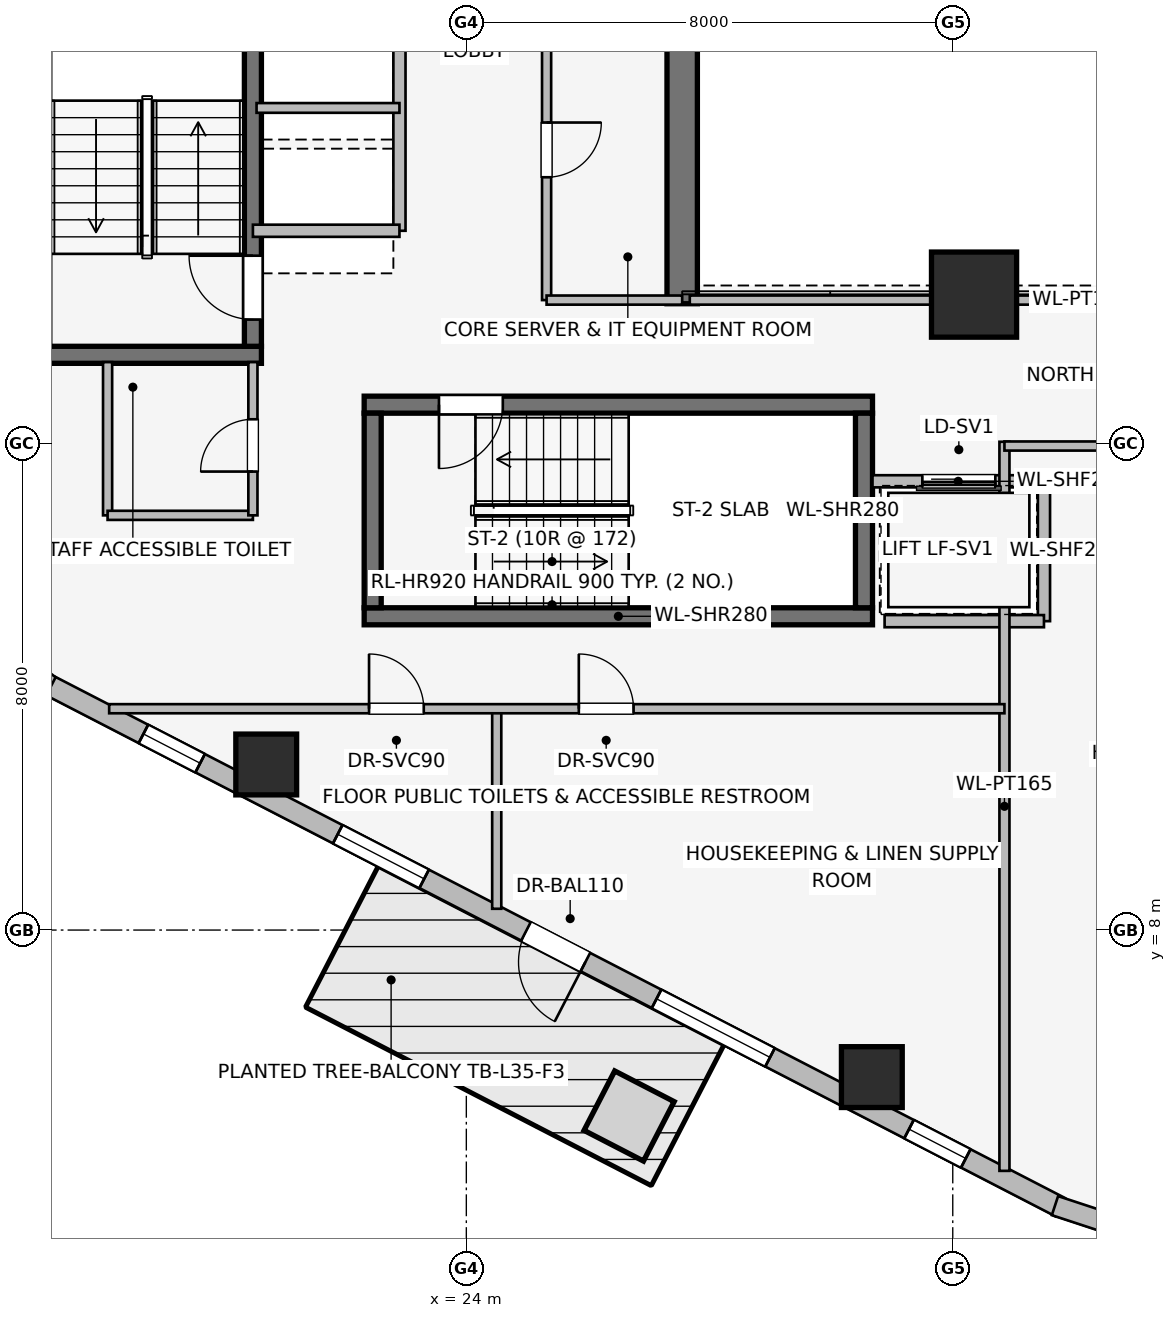
"""IFC4 building model, lengths in metres.
Left out: names, types, materials, properties, quantities, classifications, styles, units other than length and angle.
Written with IfcOpenShell. Run it as: python <this file> out.ifc"""

import sys

from ifc_helpers import new_model, si_unit, direction, frame, frame_2d, origin, origin_2d, place, context, subcontext, project, spatial, rectangle, extrude, element, fill, save


model = new_model("IFC4")
c1 = context("Model", 3, precision=1e-05, world=origin(), true_north=direction((0.0, 1.0)))
c2 = subcontext(c1, "Body", "Model", "MODEL_VIEW")
j1 = project(units=[si_unit("LENGTHUNIT", "METRE"), si_unit("PLANEANGLEUNIT", "RADIAN")], contexts=[c1])
p1 = place(None, origin())
s1 = spatial("IfcSite", under=j1, at=p1, CompositionType="ELEMENT")
p2 = place(p1, origin())
s2 = spatial("IfcBuilding", under=s1, at=p2, CompositionType="ELEMENT")
p3 = place(p2, frame((0.0, 0.0, 132.6)))
s3 = spatial("IfcBuildingStorey", under=s2, at=p3, CompositionType="ELEMENT", Elevation=132.6)
p4 = place(p3, frame((27.55, 29.55, 0.0), z_axis=(0.0, 0.0, 1.0), x_axis=(0.0, -1.0, 0.0)))
e1 = element("IfcWall", 1, at=p4, inside=s3, PredefinedType="SHEAR", context=c2, shape_type="SweptSolid", body=[
    extrude(rectangle(XDim=11.25, YDim=0.5, at=frame_2d((5.625, 0.0))), origin(), (0.0, 0.0, 1.0), 3.45),
])
p5 = place(p3, frame((16.87, 17.46, 0.0), z_axis=(0.0, 0.0, 1.0), x_axis=(1.0, 0.0, 0.0)))
e2 = element("IfcWall", 2, at=p5, inside=s3, PredefinedType="SHEAR", context=c2, shape_type="SweptSolid", body=[
    extrude(rectangle(XDim=3.76, YDim=0.28, at=frame_2d((1.88, 0.0))), origin(), (0.0, 0.0, 1.0), 3.45),
])
p6 = place(p3, frame((20.49, 17.6, 0.0), z_axis=(0.0, 0.0, 1.0), x_axis=(0.0, 1.0, 0.0)))
e3 = element("IfcWall", 3, at=p6, inside=s3, PredefinedType="SHEAR", context=c2, shape_type="SweptSolid", body=[
    extrude(rectangle(XDim=7.8, YDim=0.28, at=frame_2d((3.9, 0.0))), origin(), (0.0, 0.0, 1.0), 3.45),
])
p7 = place(p6, frame((0.44, 0.0, 0.0)))
e4 = element("IfcOpeningElement", 4, at=p7, cuts=e3, PredefinedType="OPENING", context=c2, shape_type="SweptSolid", body=[
    extrude(rectangle(XDim=1.05, YDim=2.0, at=frame_2d((0.525, 1.0))), frame((0.0, 0.15, 0.0), z_axis=(0.0, -1.0, 0.0), x_axis=(1.0, 0.0, 0.0)), (0.0, 0.0, 1.0), 0.3),
])
p8 = place(p3, frame((22.32, 13.16, 0.0), z_axis=(0.0, 0.0, 1.0), x_axis=(1.0, 0.0, 0.0)))
e5 = element("IfcWall", 5, at=p8, inside=s3, PredefinedType="SHEAR", context=c2, shape_type="SweptSolid", body=[
    extrude(rectangle(XDim=8.36, YDim=0.28, at=frame_2d((4.18, 0.0))), origin(), (0.0, 0.0, 1.0), 3.45),
])
p9 = place(p3, frame((30.68, 16.64, 0.0), z_axis=(0.0, 0.0, 1.0), x_axis=(-1.0, 0.0, 0.0)))
e6 = element("IfcWall", 6, at=p9, inside=s3, PredefinedType="SHEAR", context=c2, shape_type="SweptSolid", body=[
    extrude(rectangle(XDim=8.36, YDim=0.28, at=frame_2d((4.18, 0.0))), origin(), (0.0, 0.0, 1.0), 3.45),
])
p10 = place(p9, frame((6.08, 0.0, 0.0)))
e7 = element("IfcOpeningElement", 7, at=p10, cuts=e6, PredefinedType="OPENING", context=c2, shape_type="SweptSolid", body=[
    extrude(rectangle(XDim=1.05, YDim=2.0, at=frame_2d((0.525, 1.0))), frame((0.0, 0.15, 0.0), z_axis=(0.0, -1.0, 0.0), x_axis=(1.0, 0.0, 0.0)), (0.0, 0.0, 1.0), 0.3),
])
for number, where, z_axis, x_axis in (
    (8, (22.46, 16.5, 0.0), (0.0, 0.0, 1.0), (0.0, -1.0, 0.0)),
    (9, (30.54, 13.3, 0.0), (0.0, 0.0, 1.0), (0.0, 1.0, 0.0)),
):
    element("IfcWall", number, at=place(p3, frame(where, z_axis=z_axis, x_axis=x_axis)), inside=s3, PredefinedType="SHEAR", context=c2, shape_type="SweptSolid", body=[
        extrude(rectangle(XDim=3.2, YDim=0.28, at=frame_2d((1.6, 0.0))), origin(), (0.0, 0.0, 1.0), 3.45),
    ])
p11 = place(p3, frame((32.35, 18.45, 0.0), z_axis=(0.0, 0.0, 1.0), x_axis=(1.0, 0.0, 0.0)))
e10 = element("IfcColumn", 10, at=p11, inside=s3, PredefinedType="COLUMN", context=c2, shape_type="SweptSolid", body=[
    extrude(rectangle(XDim=1.4, YDim=1.4, at=origin_2d()), origin(), (0.0, 0.0, 1.0), 3.45),
])
for number, where, z_axis, x_axis in (
    (11, (20.709, 10.723, 0.0), (0.0, 0.0, 1.0), (1.0, 0.0, 0.0)),
    (12, (30.669, 5.582, 0.0), (0.0, 0.0, 1.0), (1.0, 0.0, 0.0)),
):
    element("IfcColumn", number, at=place(p3, frame(where, z_axis=z_axis, x_axis=x_axis)), inside=s3, PredefinedType="COLUMN", context=c2, shape_type="SweptSolid", body=[
        extrude(rectangle(XDim=1.0, YDim=1.0, at=origin_2d()), origin(), (0.0, 0.0, 1.0), 3.45),
    ])
p12 = place(p3, frame((17.243, 11.95, 0.0), z_axis=(0.0, 0.0, 1.0), x_axis=(-0.790621329885, 0.612305408053, 0.0)))
e13 = element("IfcWall", 13, at=p12, inside=s3, PredefinedType="STANDARD", context=c2, shape_type="SweptSolid", body=[
    extrude(rectangle(XDim=1.676, YDim=0.33, at=frame_2d((0.838, 0.0))), origin(), (0.0, 0.0, 1.0), 3.19),
])
p13 = place(p3, frame((33.769, 3.442, 0.0), z_axis=(0.0, 0.0, 1.0), x_axis=(-0.888613612362, 0.458656568606, 0.0)))
e14 = element("IfcWall", 14, at=p13, inside=s3, PredefinedType="STANDARD", context=c2, shape_type="SweptSolid", body=[
    extrude(rectangle(XDim=18.681, YDim=0.34, at=frame_2d((9.34, 0.0))), origin(), (0.0, 0.0, 1.0), 3.19),
])
p14 = place(p13, frame((8.79, 0.0, 0.0)))
e15 = element("IfcOpeningElement", 15, at=p14, cuts=e14, PredefinedType="OPENING", context=c2, shape_type="SweptSolid", body=[
    extrude(rectangle(XDim=1.1, YDim=2.04, at=frame_2d((0.55, 1.02))), frame((0.0, 0.18, 0.0), z_axis=(0.0, -1.0, 0.0), x_axis=(1.0, 0.0, 0.0)), (0.0, 0.0, 1.0), 0.36),
])
p15 = place(p13, frame((1.75, 0.0, 0.75)))
e16 = element("IfcOpeningElement", 16, at=p15, cuts=e14, PredefinedType="OPENING", context=c2, shape_type="SweptSolid", body=[
    extrude(rectangle(XDim=1.05, YDim=1.4, at=frame_2d((0.525, 0.7))), frame((0.0, 0.18, 0.0), z_axis=(0.0, -1.0, 0.0), x_axis=(1.0, 0.0, 0.0)), (0.0, 0.0, 1.0), 0.36),
])
p16 = place(p13, frame((5.373, 0.0, 0.75)))
e17 = element("IfcOpeningElement", 17, at=p16, cuts=e14, PredefinedType="OPENING", context=c2, shape_type="SweptSolid", body=[
    extrude(rectangle(XDim=2.1, YDim=1.5, at=frame_2d((1.05, 0.75))), frame((0.0, 0.18, 0.0), z_axis=(0.0, -1.0, 0.0), x_axis=(1.0, 0.0, 0.0)), (0.0, 0.0, 1.0), 0.36),
])
p17 = place(p13, frame((11.774, 0.0, 0.75)))
e18 = element("IfcOpeningElement", 18, at=p17, cuts=e14, PredefinedType="OPENING", context=c2, shape_type="SweptSolid", body=[
    extrude(rectangle(XDim=1.6, YDim=1.55, at=frame_2d((0.8, 0.775))), frame((0.0, 0.18, 0.0), z_axis=(0.0, -1.0, 0.0), x_axis=(1.0, 0.0, 0.0)), (0.0, 0.0, 1.0), 0.36),
])
p18 = place(p13, frame((15.92, 0.0, 0.75)))
e19 = element("IfcOpeningElement", 19, at=p18, cuts=e14, PredefinedType="OPENING", context=c2, shape_type="SweptSolid", body=[
    extrude(rectangle(XDim=1.05, YDim=1.4, at=frame_2d((0.525, 0.7))), frame((0.0, 0.18, 0.0), z_axis=(0.0, -1.0, 0.0), x_axis=(1.0, 0.0, 0.0)), (0.0, 0.0, 1.0), 0.36),
])
p19 = place(p3, frame((35.317, 2.93, 0.0), z_axis=(0.0, 0.0, 1.0), x_axis=(-0.949937416267, 0.312440242569, 0.0)))
e20 = element("IfcWall", 20, at=p19, inside=s3, PredefinedType="STANDARD", context=c2, shape_type="SweptSolid", body=[
    extrude(rectangle(XDim=1.722, YDim=0.33, at=frame_2d((0.861, 0.0))), origin(), (0.0, 0.0, 1.0), 3.19),
])
p20 = place(p3, frame((33.5, 15.38, 0.0), z_axis=(0.0, 0.0, 1.0), x_axis=(-1.0, 0.0, 0.0)))
e21 = element("IfcWall", 21, at=p20, inside=s3, PredefinedType="PARTITIONING", context=c2, shape_type="SweptSolid", body=[
    extrude(rectangle(XDim=2.82, YDim=0.2, at=frame_2d((1.41, 0.0))), origin(), (0.0, 0.0, 1.0), 3.19),
])
p21 = place(p20, frame((0.8, 0.0, 0.0)))
e22 = element("IfcOpeningElement", 22, at=p21, cuts=e21, PredefinedType="OPENING", context=c2, shape_type="SweptSolid", body=[
    extrude(rectangle(XDim=1.2, YDim=2.2, at=frame_2d((0.6, 1.1))), frame((0.0, 0.11, 0.0), z_axis=(0.0, -1.0, 0.0), x_axis=(1.0, 0.0, 0.0)), (0.0, 0.0, 1.0), 0.22),
])
p22 = place(p3, frame((33.5, 13.08, 0.0), z_axis=(0.0, 0.0, 1.0), x_axis=(0.0, 1.0, 0.0)))
e23 = element("IfcWall", 23, at=p22, inside=s3, PredefinedType="PARTITIONING", context=c2, shape_type="SweptSolid", body=[
    extrude(rectangle(XDim=2.3, YDim=0.2, at=frame_2d((1.15, 0.0))), origin(), (0.0, 0.0, 1.0), 3.19),
])
p23 = place(p3, frame((30.879, 13.08, 0.0), z_axis=(0.0, 0.0, 1.0), x_axis=(1.0, 0.0, 0.0)))
e24 = element("IfcWall", 24, at=p23, inside=s3, PredefinedType="PARTITIONING", context=c2, shape_type="SweptSolid", body=[
    extrude(rectangle(XDim=2.621, YDim=0.2, at=frame_2d((1.311, 0.0))), origin(), (0.0, 0.0, 1.0), 3.19),
])
p24 = place(p3, frame((22.9, 19.5, 0.0), z_axis=(0.0, 0.0, 1.0), x_axis=(0.0, 1.0, 0.0)))
e25 = element("IfcWall", 25, at=p24, inside=s3, PredefinedType="PARTITIONING", context=c2, shape_type="SweptSolid", body=[
    extrude(rectangle(XDim=6.085, YDim=0.2, at=frame_2d((3.042, 0.0))), origin(), (0.0, 0.0, 1.0), 3.19),
])
p25 = place(p3, frame((20.49, 19.5, 0.0), z_axis=(0.0, 0.0, 1.0), x_axis=(1.0, 0.0, 0.0)))
e26 = element("IfcWall", 26, at=p25, inside=s3, PredefinedType="PARTITIONING", context=c2, shape_type="SweptSolid", body=[
    extrude(rectangle(XDim=2.41, YDim=0.2, at=frame_2d((1.205, 0.0))), origin(), (0.0, 0.0, 1.0), 2.09),
])
p26 = place(p3, frame((20.55, 21.52, 0.0), z_axis=(0.0, 0.0, 1.0), x_axis=(1.0, 0.0, 0.0)))
e27 = element("IfcWall", 27, at=p26, inside=s3, PredefinedType="PARTITIONING", context=c2, shape_type="SweptSolid", body=[
    extrude(rectangle(XDim=2.35, YDim=0.16, at=frame_2d((1.175, 0.0))), origin(), (0.0, 0.0, 1.0), 3.19),
])
p27 = place(p3, frame((25.32, 23.13, 0.0), z_axis=(0.0, 0.0, 1.0), x_axis=(0.0, -1.0, 0.0)))
e28 = element("IfcWall", 28, at=p27, inside=s3, PredefinedType="PARTITIONING", context=c2, shape_type="SweptSolid", body=[
    extrude(rectangle(XDim=4.77, YDim=0.15, at=frame_2d((2.385, 0.0))), origin(), (0.0, 0.0, 1.0), 3.19),
])
p28 = place(p27, frame((1.85, 0.0, 0.0)))
e29 = element("IfcOpeningElement", 29, at=p28, cuts=e28, PredefinedType="OPENING", context=c2, shape_type="SweptSolid", body=[
    extrude(rectangle(XDim=0.9, YDim=2.0, at=frame_2d((0.45, 1.0))), frame((0.0, 0.085, 0.0), z_axis=(0.0, -1.0, 0.0), x_axis=(1.0, 0.0, 0.0)), (0.0, 0.0, 1.0), 0.17),
])
p29 = place(p3, frame((25.32, 18.36, 0.0), z_axis=(0.0, 0.0, 1.0), x_axis=(1.0, 0.0, 0.0)))
e30 = element("IfcWall", 30, at=p29, inside=s3, PredefinedType="PARTITIONING", context=c2, shape_type="SweptSolid", body=[
    extrude(rectangle(XDim=2.23, YDim=0.15, at=frame_2d((1.115, 0.0))), origin(), (0.0, 0.0, 1.0), 3.19),
])
p30 = place(p3, frame((18.1, 17.34, 0.0), z_axis=(0.0, 0.0, 1.0), x_axis=(0.0, -1.0, 0.0)))
e31 = element("IfcWall", 31, at=p30, inside=s3, PredefinedType="PARTITIONING", context=c2, shape_type="SweptSolid", body=[
    extrude(rectangle(XDim=2.52, YDim=0.15, at=frame_2d((1.26, 0.0))), origin(), (0.0, 0.0, 1.0), 3.19),
])
p31 = place(p3, frame((18.1, 14.82, 0.0), z_axis=(0.0, 0.0, 1.0), x_axis=(1.0, 0.0, 0.0)))
e32 = element("IfcWall", 32, at=p31, inside=s3, PredefinedType="PARTITIONING", context=c2, shape_type="SweptSolid", body=[
    extrude(rectangle(XDim=2.39, YDim=0.15, at=frame_2d((1.195, 0.0))), origin(), (0.0, 0.0, 1.0), 3.19),
])
p32 = place(p3, frame((20.49, 14.82, 0.0), z_axis=(0.0, 0.0, 1.0), x_axis=(0.0, 1.0, 0.0)))
e33 = element("IfcWall", 33, at=p32, inside=s3, PredefinedType="PARTITIONING", context=c2, shape_type="SweptSolid", body=[
    extrude(rectangle(XDim=2.52, YDim=0.15, at=frame_2d((1.26, 0.0))), origin(), (0.0, 0.0, 1.0), 3.19),
])
p33 = place(p32, frame((0.72, 0.0, 0.0)))
e34 = element("IfcOpeningElement", 34, at=p33, cuts=e33, PredefinedType="OPENING", context=c2, shape_type="SweptSolid", body=[
    extrude(rectangle(XDim=0.86, YDim=2.0, at=frame_2d((0.43, 1.0))), frame((0.0, 0.085, 0.0), z_axis=(0.0, -1.0, 0.0), x_axis=(1.0, 0.0, 0.0)), (0.0, 0.0, 1.0), 0.17),
])
p34 = place(p3, frame((27.675, 18.36, 0.0), z_axis=(0.0, 0.0, 1.0), x_axis=(1.0, 0.0, 0.0)))
e35 = element("IfcWall", 35, at=p34, inside=s3, PredefinedType="PARTITIONING", context=c2, shape_type="SweptSolid", body=[
    extrude(rectangle(XDim=12.165, YDim=0.15, at=frame_2d((6.083, 0.0))), origin(), (0.0, 0.0, 1.0), 2.331),
])
p35 = place(p3, frame((32.85, 4.04, 0.0), z_axis=(0.0, 0.0, 1.0), x_axis=(0.0, 1.0, 0.0)))
e36 = element("IfcWall", 36, at=p35, inside=s3, PredefinedType="PARTITIONING", context=c2, shape_type="SweptSolid", body=[
    extrude(rectangle(XDim=11.99, YDim=0.165, at=frame_2d((5.995, 0.0))), origin(), (0.0, 0.0, 1.0), 3.19),
])
p36 = place(p3, frame((24.5, 8.35, 0.0), z_axis=(0.0, 0.0, 1.0), x_axis=(0.0, 1.0, 0.0)))
e37 = element("IfcWall", 37, at=p36, inside=s3, PredefinedType="PARTITIONING", context=c2, shape_type="SweptSolid", body=[
    extrude(rectangle(XDim=3.29, YDim=0.15, at=frame_2d((1.645, 0.0))), origin(), (0.0, 0.0, 1.0), 3.19),
])
p37 = place(p3, frame((18.126, 11.64, 0.0), z_axis=(0.0, 0.0, 1.0), x_axis=(1.0, 0.0, 0.0)))
e38 = element("IfcWall", 38, at=p37, inside=s3, PredefinedType="PARTITIONING", context=c2, shape_type="SweptSolid", body=[
    extrude(rectangle(XDim=14.724, YDim=0.15, at=frame_2d((7.362, 0.0))), origin(), (0.0, 0.0, 1.0), 3.19),
])
p38 = place(p37, frame((4.274, 0.0, 0.0)))
e39 = element("IfcOpeningElement", 39, at=p38, cuts=e38, PredefinedType="OPENING", context=c2, shape_type="SweptSolid", body=[
    extrude(rectangle(XDim=0.9, YDim=2.0, at=frame_2d((0.45, 1.0))), frame((0.0, 0.085, 0.0), z_axis=(0.0, -1.0, 0.0), x_axis=(1.0, 0.0, 0.0)), (0.0, 0.0, 1.0), 0.17),
])
p39 = place(p37, frame((7.724, 0.0, 0.0)))
e40 = element("IfcOpeningElement", 40, at=p39, cuts=e38, PredefinedType="OPENING", context=c2, shape_type="SweptSolid", body=[
    extrude(rectangle(XDim=0.9, YDim=2.0, at=frame_2d((0.45, 1.0))), frame((0.0, 0.085, 0.0), z_axis=(0.0, -1.0, 0.0), x_axis=(1.0, 0.0, 0.0)), (0.0, 0.0, 1.0), 0.17),
])
p40 = place(p3, frame((32.85, 15.96, 0.0), z_axis=(0.0, 0.0, 1.0), x_axis=(1.0, 0.0, 0.0)))
e41 = element("IfcWall", 41, at=p40, inside=s3, PredefinedType="PARTITIONING", context=c2, shape_type="SweptSolid", body=[
    extrude(rectangle(XDim=24.358, YDim=0.15, at=frame_2d((12.179, 0.0))), origin(), (0.0, 0.0, 1.0), 3.19),
])
p41 = place(p40, frame((11.713, 0.0, 0.0)))
e42 = element("IfcOpeningElement", 42, at=p41, cuts=e41, PredefinedType="OPENING", context=c2, shape_type="SweptSolid", body=[
    extrude(rectangle(XDim=0.96, YDim=2.0, at=frame_2d((0.48, 1.0))), frame((0.0, 0.085, 0.0), z_axis=(0.0, -1.0, 0.0), x_axis=(1.0, 0.0, 0.0)), (0.0, 0.0, 1.0), 0.17),
])
p42 = place(p14, origin())
e43 = element("IfcDoor", 43, at=p42, inside=s3, OperationType="SINGLE_SWING_LEFT", PredefinedType="DOOR", context=c2, shape_type="SweptSolid", body=[
    extrude(rectangle(XDim=1.1, YDim=2.04, at=frame_2d((0.55, 1.02))), frame((0.0, 0.025, 0.0), z_axis=(0.0, -1.0, 0.0), x_axis=(1.0, 0.0, 0.0)), (0.0, 0.0, 1.0), 0.05),
])
fill(e15, e43)
p43 = place(p15, origin())
e44 = element("IfcWindow", 44, at=p43, inside=s3, PartitioningType="SINGLE_PANEL", PredefinedType="WINDOW", context=c2, shape_type="SweptSolid", body=[
    extrude(rectangle(XDim=1.05, YDim=1.4, at=frame_2d((0.525, 0.7))), frame((0.0, 0.03, 0.0), z_axis=(0.0, -1.0, 0.0), x_axis=(1.0, 0.0, 0.0)), (0.0, 0.0, 1.0), 0.06),
])
fill(e16, e44)
p44 = place(p16, origin())
e45 = element("IfcWindow", 45, at=p44, inside=s3, PartitioningType="SINGLE_PANEL", PredefinedType="WINDOW", context=c2, shape_type="SweptSolid", body=[
    extrude(rectangle(XDim=2.1, YDim=1.5, at=frame_2d((1.05, 0.75))), frame((0.0, 0.03, 0.0), z_axis=(0.0, -1.0, 0.0), x_axis=(1.0, 0.0, 0.0)), (0.0, 0.0, 1.0), 0.06),
])
fill(e17, e45)
p45 = place(p17, origin())
e46 = element("IfcWindow", 46, at=p45, inside=s3, PartitioningType="SINGLE_PANEL", PredefinedType="WINDOW", context=c2, shape_type="SweptSolid", body=[
    extrude(rectangle(XDim=1.6, YDim=1.55, at=frame_2d((0.8, 0.775))), frame((0.0, 0.03, 0.0), z_axis=(0.0, -1.0, 0.0), x_axis=(1.0, 0.0, 0.0)), (0.0, 0.0, 1.0), 0.06),
])
fill(e18, e46)
p46 = place(p18, origin())
e47 = element("IfcWindow", 47, at=p46, inside=s3, PartitioningType="SINGLE_PANEL", PredefinedType="WINDOW", context=c2, shape_type="SweptSolid", body=[
    extrude(rectangle(XDim=1.05, YDim=1.4, at=frame_2d((0.525, 0.7))), frame((0.0, 0.03, 0.0), z_axis=(0.0, -1.0, 0.0), x_axis=(1.0, 0.0, 0.0)), (0.0, 0.0, 1.0), 0.06),
])
fill(e19, e47)
p47 = place(p7, origin())
e48 = element("IfcDoor", 48, at=p47, inside=s3, OperationType="SINGLE_SWING_RIGHT", PredefinedType="DOOR", context=c2, shape_type="SweptSolid", body=[
    extrude(rectangle(XDim=1.05, YDim=2.0, at=frame_2d((0.525, 1.0))), frame((0.0, 0.025, 0.0), z_axis=(0.0, -1.0, 0.0), x_axis=(1.0, 0.0, 0.0)), (0.0, 0.0, 1.0), 0.05),
])
fill(e4, e48)
p48 = place(p10, origin())
e49 = element("IfcDoor", 49, at=p48, inside=s3, OperationType="SINGLE_SWING_RIGHT", PredefinedType="DOOR", context=c2, shape_type="SweptSolid", body=[
    extrude(rectangle(XDim=1.05, YDim=2.0, at=frame_2d((0.525, 1.0))), frame((0.0, 0.025, 0.0), z_axis=(0.0, -1.0, 0.0), x_axis=(1.0, 0.0, 0.0)), (0.0, 0.0, 1.0), 0.05),
])
fill(e7, e49)
p49 = place(p21, origin())
e50 = element("IfcDoor", 50, at=p49, inside=s3, OperationType="SLIDING_TO_RIGHT", PredefinedType="DOOR", context=c2, shape_type="SweptSolid", body=[
    extrude(rectangle(XDim=1.2, YDim=2.2, at=frame_2d((0.6, 1.1))), frame((0.0, 0.025, 0.0), z_axis=(0.0, -1.0, 0.0), x_axis=(1.0, 0.0, 0.0)), (0.0, 0.0, 1.0), 0.05),
])
fill(e22, e50)
p50 = place(p28, origin())
e51 = element("IfcDoor", 51, at=p50, inside=s3, OperationType="SINGLE_SWING_LEFT", PredefinedType="DOOR", context=c2, shape_type="SweptSolid", body=[
    extrude(rectangle(XDim=0.9, YDim=2.0, at=frame_2d((0.45, 1.0))), frame((0.0, 0.025, 0.0), z_axis=(0.0, -1.0, 0.0), x_axis=(1.0, 0.0, 0.0)), (0.0, 0.0, 1.0), 0.05),
])
fill(e29, e51)
p51 = place(p33, origin())
e52 = element("IfcDoor", 52, at=p51, inside=s3, OperationType="SINGLE_SWING_LEFT", PredefinedType="DOOR", context=c2, shape_type="SweptSolid", body=[
    extrude(rectangle(XDim=0.86, YDim=2.0, at=frame_2d((0.43, 1.0))), frame((0.0, 0.025, 0.0), z_axis=(0.0, -1.0, 0.0), x_axis=(1.0, 0.0, 0.0)), (0.0, 0.0, 1.0), 0.05),
])
fill(e34, e52)
p52 = place(p38, origin())
e53 = element("IfcDoor", 53, at=p52, inside=s3, OperationType="SINGLE_SWING_LEFT", PredefinedType="DOOR", context=c2, shape_type="SweptSolid", body=[
    extrude(rectangle(XDim=0.9, YDim=2.0, at=frame_2d((0.45, 1.0))), frame((0.0, 0.025, 0.0), z_axis=(0.0, -1.0, 0.0), x_axis=(1.0, 0.0, 0.0)), (0.0, 0.0, 1.0), 0.05),
])
fill(e39, e53)
p53 = place(p39, origin())
e54 = element("IfcDoor", 54, at=p53, inside=s3, OperationType="SINGLE_SWING_LEFT", PredefinedType="DOOR", context=c2, shape_type="SweptSolid", body=[
    extrude(rectangle(XDim=0.9, YDim=2.0, at=frame_2d((0.45, 1.0))), frame((0.0, 0.025, 0.0), z_axis=(0.0, -1.0, 0.0), x_axis=(1.0, 0.0, 0.0)), (0.0, 0.0, 1.0), 0.05),
])
fill(e40, e54)
save(model, sys.argv[1])
